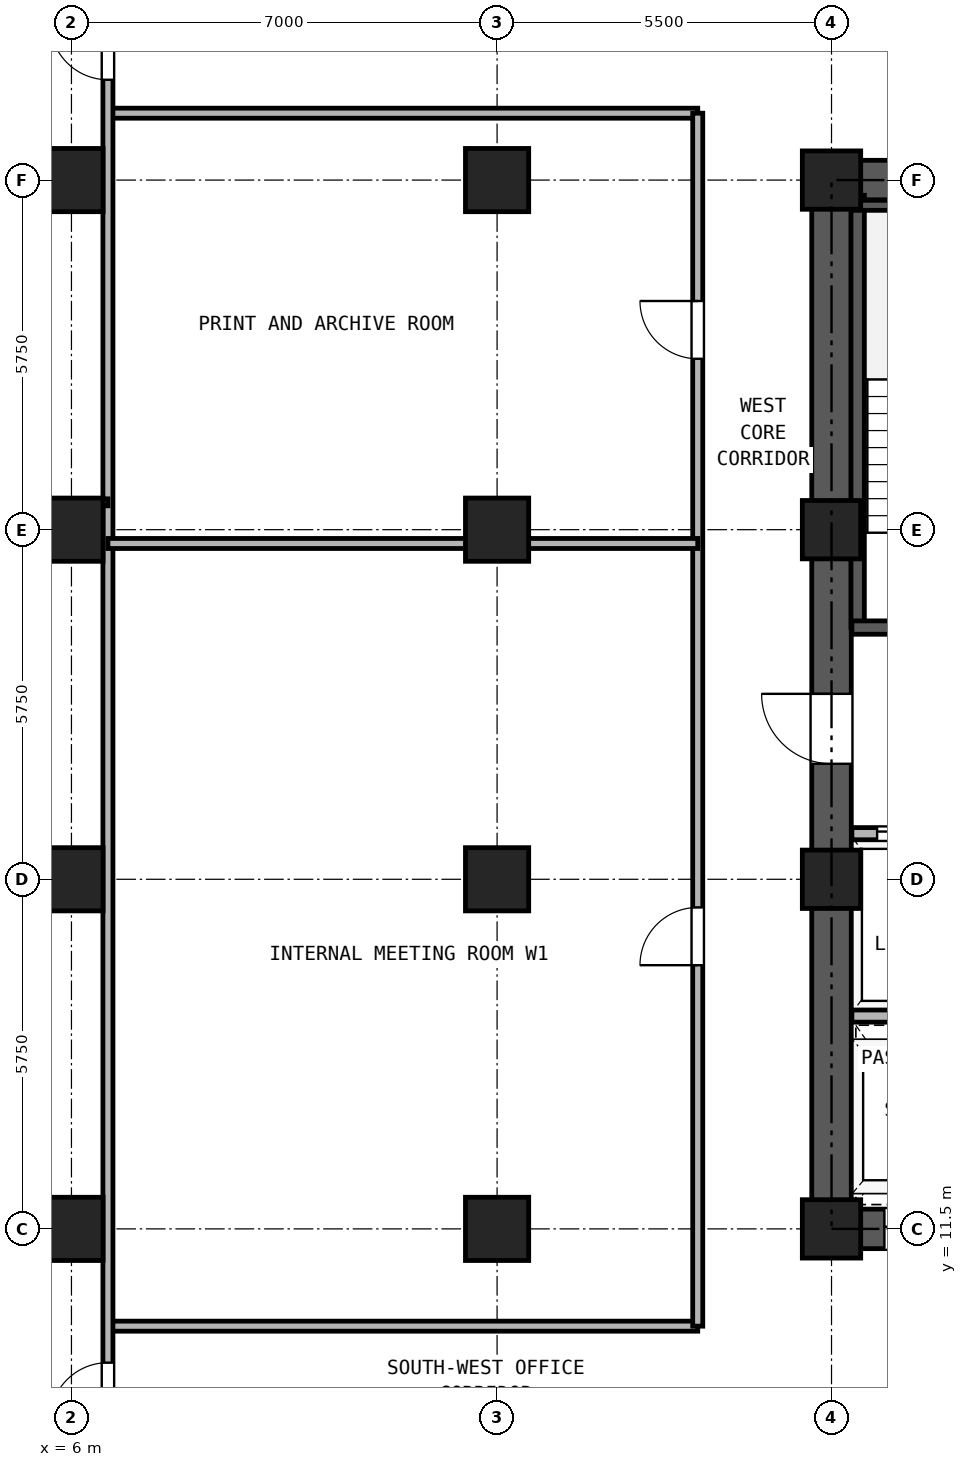
"""IFC4 building model, lengths in metres.
Left out: names, types, materials, properties, quantities, classifications, styles, units other than length and angle.
Written with IfcOpenShell. Run it as: python <this file> out.ifc"""

import sys

from ifc_helpers import new_model, si_unit, direction, frame, frame_2d, origin, origin_2d, place, context, subcontext, project, spatial, rectangle, hollow_rectangle, extrude, source, transform, mapped, element, fill, save


model = new_model("IFC4")
c1 = context("Model", 3, precision=1e-05, world=origin(), true_north=direction((0.0, 1.0)))
c2 = subcontext(c1, "Body", "Model", "MODEL_VIEW")
j1 = project(units=[si_unit("LENGTHUNIT", "METRE"), si_unit("PLANEANGLEUNIT", "RADIAN")], contexts=[c1])
p1 = place(None, origin())
s1 = spatial("IfcSite", under=j1, at=p1, CompositionType="ELEMENT")
p2 = place(p1, origin())
s2 = spatial("IfcBuilding", under=s1, at=p2, CompositionType="ELEMENT")
p3 = place(p2, frame((0.0, 0.0, 84.6)))
s3 = spatial("IfcBuildingStorey", under=s2, at=p3, CompositionType="ELEMENT", Elevation=84.6)
m1 = source(origin(), c2, "Body", "SweptSolid", [
    extrude(hollow_rectangle(XDim=1.04, YDim=1.04, WallThickness=0.065, at=origin_2d()), origin(), (0.0, 0.0, 1.0), 3.24),
])
for number, where, z_axis, x_axis in (
    (1, (6.0, 11.5, 0.0), (0.0, 0.0, 1.0), (1.0, 0.0, 0.0)),
    (2, (6.0, 17.25, 0.0), (0.0, 0.0, 1.0), (1.0, 0.0, 0.0)),
    (3, (6.0, 23.0, 0.0), (0.0, 0.0, 1.0), (1.0, 0.0, 0.0)),
    (4, (6.0, 28.75, 0.0), (0.0, 0.0, 1.0), (1.0, 0.0, 0.0)),
    (5, (13.0, 11.5, 0.0), (0.0, 0.0, 1.0), (1.0, 0.0, 0.0)),
    (6, (13.0, 17.25, 0.0), (0.0, 0.0, 1.0), (1.0, 0.0, 0.0)),
    (7, (13.0, 23.0, 0.0), (0.0, 0.0, 1.0), (1.0, 0.0, 0.0)),
    (8, (13.0, 28.75, 0.0), (0.0, 0.0, 1.0), (1.0, 0.0, 0.0)),
):
    element("IfcColumn", number, at=place(p3, frame(where, z_axis=z_axis, x_axis=x_axis)), inside=s3, PredefinedType="COLUMN", context=c2, shape_type="MappedRepresentation", body=[
        mapped(m1, transform((0.0, 0.0, 0.0), x_axis=(1.0, 0.0, 0.0), y_axis=(0.0, 1.0, 0.0), z_axis=(0.0, 0.0, 1.0), scale=1.0)),
    ])
m2 = source(origin(), c2, "Body", "SweptSolid", [
    extrude(hollow_rectangle(XDim=0.96, YDim=0.96, WallThickness=0.06, at=origin_2d()), origin(), (0.0, 0.0, 1.0), 3.24),
])
for number, where, z_axis, x_axis in (
    (9, (18.5, 11.5, 0.0), (0.0, 0.0, 1.0), (1.0, 0.0, 0.0)),
    (10, (18.5, 17.25, 0.0), (0.0, 0.0, 1.0), (1.0, 0.0, 0.0)),
    (11, (18.5, 23.0, 0.0), (0.0, 0.0, 1.0), (1.0, 0.0, 0.0)),
    (12, (18.5, 28.75, 0.0), (0.0, 0.0, 1.0), (1.0, 0.0, 0.0)),
):
    element("IfcColumn", number, at=place(p3, frame(where, z_axis=z_axis, x_axis=x_axis)), inside=s3, PredefinedType="COLUMN", context=c2, shape_type="MappedRepresentation", body=[
        mapped(m2, transform((0.0, 0.0, 0.0), x_axis=(1.0, 0.0, 0.0), y_axis=(0.0, 1.0, 0.0), z_axis=(0.0, 0.0, 1.0), scale=1.0)),
    ])
p4 = place(p3, frame((18.175, 11.5, 0.0), z_axis=(0.0, 0.0, 1.0), x_axis=(1.0, 0.0, 0.0)))
e13 = element("IfcWall", 13, at=p4, inside=s3, PredefinedType="SHEAR", context=c2, shape_type="SweptSolid", body=[
    extrude(rectangle(XDim=10.65, YDim=0.65, at=frame_2d((5.325, 0.0))), origin(), (0.0, 0.0, 1.0), 3.24),
])
p5 = place(p4, frame((1.195, 0.0, 0.0)))
e14 = element("IfcOpeningElement", 14, at=p5, cuts=e13, PredefinedType="OPENING", context=c2, shape_type="SweptSolid", body=[
    extrude(rectangle(XDim=1.1, YDim=2.25, at=frame_2d((0.55, 1.125))), frame((0.0, 0.335, 0.0), z_axis=(0.0, -1.0, 0.0), x_axis=(1.0, 0.0, 0.0)), (0.0, 0.0, 1.0), 0.67),
])
p6 = place(p4, frame((3.495, 0.0, 0.0)))
e15 = element("IfcOpeningElement", 15, at=p6, cuts=e13, PredefinedType="OPENING", context=c2, shape_type="SweptSolid", body=[
    extrude(rectangle(XDim=1.1, YDim=2.25, at=frame_2d((0.55, 1.125))), frame((0.0, 0.335, 0.0), z_axis=(0.0, -1.0, 0.0), x_axis=(1.0, 0.0, 0.0)), (0.0, 0.0, 1.0), 0.67),
])
p7 = place(p4, frame((5.925, 0.0, 0.0)))
e16 = element("IfcOpeningElement", 16, at=p7, cuts=e13, PredefinedType="OPENING", context=c2, shape_type="SweptSolid", body=[
    extrude(rectangle(XDim=1.1, YDim=2.25, at=frame_2d((0.55, 1.125))), frame((0.0, 0.335, 0.0), z_axis=(0.0, -1.0, 0.0), x_axis=(1.0, 0.0, 0.0)), (0.0, 0.0, 1.0), 0.67),
])
p8 = place(p4, frame((8.325, 0.0, 0.0)))
e17 = element("IfcOpeningElement", 17, at=p8, cuts=e13, PredefinedType="OPENING", context=c2, shape_type="SweptSolid", body=[
    extrude(rectangle(XDim=1.1, YDim=2.25, at=frame_2d((0.55, 1.125))), frame((0.0, 0.335, 0.0), z_axis=(0.0, -1.0, 0.0), x_axis=(1.0, 0.0, 0.0)), (0.0, 0.0, 1.0), 0.67),
])
p9 = place(p3, frame((18.175, 28.75, 0.0), z_axis=(0.0, 0.0, 1.0), x_axis=(1.0, 0.0, 0.0)))
e18 = element("IfcWall", 18, at=p9, inside=s3, PredefinedType="SHEAR", context=c2, shape_type="SweptSolid", body=[
    extrude(rectangle(XDim=10.65, YDim=0.65, at=frame_2d((5.325, 0.0))), origin(), (0.0, 0.0, 1.0), 3.24),
])
p10 = place(p9, frame((4.205, 0.0, 0.0)))
e19 = element("IfcOpeningElement", 19, at=p10, cuts=e18, PredefinedType="OPENING", context=c2, shape_type="SweptSolid", body=[
    extrude(rectangle(XDim=0.9, YDim=2.05, at=frame_2d((0.45, 1.025))), frame((0.0, 0.335, 0.0), z_axis=(0.0, -1.0, 0.0), x_axis=(1.0, 0.0, 0.0)), (0.0, 0.0, 1.0), 0.67),
])
p11 = place(p9, frame((5.745, 0.0, 0.0)))
e20 = element("IfcOpeningElement", 20, at=p11, cuts=e18, PredefinedType="OPENING", context=c2, shape_type="SweptSolid", body=[
    extrude(rectangle(XDim=0.9, YDim=2.05, at=frame_2d((0.45, 1.025))), frame((0.0, 0.335, 0.0), z_axis=(0.0, -1.0, 0.0), x_axis=(1.0, 0.0, 0.0)), (0.0, 0.0, 1.0), 0.67),
])
p12 = place(p3, frame((18.5, 11.825, 0.0), z_axis=(0.0, 0.0, 1.0), x_axis=(0.0, 1.0, 0.0)))
e21 = element("IfcWall", 21, at=p12, inside=s3, PredefinedType="SHEAR", context=c2, shape_type="SweptSolid", body=[
    extrude(rectangle(XDim=16.6, YDim=0.65, at=frame_2d((8.3, 0.0))), origin(), (0.0, 0.0, 1.0), 3.24),
])
p13 = place(p12, frame((7.325, 0.0, 0.0)))
e22 = element("IfcOpeningElement", 22, at=p13, cuts=e21, PredefinedType="OPENING", context=c2, shape_type="SweptSolid", body=[
    extrude(rectangle(XDim=1.15, YDim=2.2, at=frame_2d((0.575, 1.1))), frame((0.0, 0.335, 0.0), z_axis=(0.0, -1.0, 0.0), x_axis=(1.0, 0.0, 0.0)), (0.0, 0.0, 1.0), 0.67),
])
p14 = place(p3, frame((18.93, 21.39, 0.0), z_axis=(0.0, 0.0, 1.0), x_axis=(0.0, 1.0, 0.0)))
e23 = element("IfcWall", 23, at=p14, inside=s3, PredefinedType="SOLIDWALL", context=c2, shape_type="SweptSolid", body=[
    extrude(rectangle(XDim=7.11, YDim=0.22, at=frame_2d((3.555, 0.0))), origin(), (0.0, 0.0, 1.0), 3.24),
])
p15 = place(p3, frame((18.835, 28.335, 0.0), z_axis=(0.0, 0.0, 1.0), x_axis=(1.0, 0.0, 0.0)))
e24 = element("IfcWall", 24, at=p15, inside=s3, PredefinedType="PARTITIONING", context=c2, shape_type="SweptSolid", body=[
    extrude(rectangle(XDim=3.275, YDim=0.165, at=frame_2d((1.638, 0.0))), origin(), (0.0, 0.0, 1.0), 3.24),
])
p16 = place(p3, frame((18.835, 21.39, 0.0), z_axis=(0.0, 0.0, 1.0), x_axis=(1.0, 0.0, 0.0)))
e25 = element("IfcWall", 25, at=p16, inside=s3, PredefinedType="SOLIDWALL", context=c2, shape_type="SweptSolid", body=[
    extrude(rectangle(XDim=6.295, YDim=0.22, at=frame_2d((3.147, 0.0))), origin(), (0.0, 0.0, 1.0), 3.24),
])
p17 = place(p16, frame((1.015, 0.0, 0.0)))
e26 = element("IfcOpeningElement", 26, at=p17, cuts=e25, PredefinedType="OPENING", context=c2, shape_type="SweptSolid", body=[
    extrude(rectangle(XDim=1.15, YDim=2.2, at=frame_2d((0.575, 1.1))), frame((0.0, 0.12, 0.0), z_axis=(0.0, -1.0, 0.0), x_axis=(1.0, 0.0, 0.0)), (0.0, 0.0, 1.0), 0.24),
])
p18 = place(p16, frame((4.745, 0.0, 0.0)))
e27 = element("IfcOpeningElement", 27, at=p18, cuts=e25, PredefinedType="OPENING", context=c2, shape_type="SweptSolid", body=[
    extrude(rectangle(XDim=1.1, YDim=2.25, at=frame_2d((0.55, 1.125))), frame((0.0, 0.12, 0.0), z_axis=(0.0, -1.0, 0.0), x_axis=(1.0, 0.0, 0.0)), (0.0, 0.0, 1.0), 0.24),
])
p19 = place(p3, frame((18.835, 18.0, 0.0), z_axis=(0.0, 0.0, 1.0), x_axis=(1.0, 0.0, 0.0)))
e28 = element("IfcWall", 28, at=p19, inside=s3, PredefinedType="PARTITIONING", context=c2, shape_type="SweptSolid", body=[
    extrude(rectangle(XDim=9.33, YDim=0.2, at=frame_2d((4.665, 0.0))), origin(), (0.0, 0.0, 1.0), 3.24),
])
p20 = place(p19, frame((0.415, 0.0, 0.0)))
e29 = element("IfcOpeningElement", 29, at=p20, cuts=e28, PredefinedType="OPENING", context=c2, shape_type="SweptSolid", body=[
    extrude(rectangle(XDim=1.3, YDim=2.3, at=frame_2d((0.65, 1.15))), frame((0.0, 0.11, 0.0), z_axis=(0.0, -1.0, 0.0), x_axis=(1.0, 0.0, 0.0)), (0.0, 0.0, 1.0), 0.22),
])
p21 = place(p19, frame((2.515, 0.0, 0.0)))
e30 = element("IfcOpeningElement", 30, at=p21, cuts=e28, PredefinedType="OPENING", context=c2, shape_type="SweptSolid", body=[
    extrude(rectangle(XDim=1.3, YDim=2.3, at=frame_2d((0.65, 1.15))), frame((0.0, 0.11, 0.0), z_axis=(0.0, -1.0, 0.0), x_axis=(1.0, 0.0, 0.0)), (0.0, 0.0, 1.0), 0.22),
])
p22 = place(p19, frame((7.015, 0.0, 0.0)))
e31 = element("IfcOpeningElement", 31, at=p22, cuts=e28, PredefinedType="OPENING", context=c2, shape_type="SweptSolid", body=[
    extrude(rectangle(XDim=1.0, YDim=2.15, at=frame_2d((0.5, 1.075))), frame((0.0, 0.11, 0.0), z_axis=(0.0, -1.0, 0.0), x_axis=(1.0, 0.0, 0.0)), (0.0, 0.0, 1.0), 0.22),
])
p23 = place(p3, frame((18.835, 15.0, 0.0), z_axis=(0.0, 0.0, 1.0), x_axis=(1.0, 0.0, 0.0)))
e32 = element("IfcWall", 32, at=p23, inside=s3, PredefinedType="PARTITIONING", context=c2, shape_type="SweptSolid", body=[
    extrude(rectangle(XDim=9.33, YDim=0.2, at=frame_2d((4.665, 0.0))), origin(), (0.0, 0.0, 1.0), 3.24),
])
for number, where, z_axis, x_axis in (
    (33, (6.6, 9.9, 0.0), (0.0, 0.0, 1.0), (1.0, 0.0, 0.0)),
    (34, (6.6, 29.85, 0.0), (0.0, 0.0, 1.0), (1.0, 0.0, 0.0)),
):
    element("IfcWall", number, at=place(p3, frame(where, z_axis=z_axis, x_axis=x_axis)), inside=s3, PredefinedType="PARTITIONING", context=c2, shape_type="SweptSolid", body=[
        extrude(rectangle(XDim=9.7, YDim=0.165, at=frame_2d((4.85, 0.0))), origin(), (0.0, 0.0, 1.0), 3.24),
    ])
p24 = place(p3, frame((16.3, 9.9, 0.0), z_axis=(0.0, 0.0, 1.0), x_axis=(0.0, 1.0, 0.0)))
e35 = element("IfcWall", 35, at=p24, inside=s3, PredefinedType="PARTITIONING", context=c2, shape_type="SweptSolid", body=[
    extrude(rectangle(XDim=19.95, YDim=0.165, at=frame_2d((9.975, 0.0))), origin(), (0.0, 0.0, 1.0), 3.24),
])
p25 = place(p24, frame((5.937, 0.0, 0.0)))
e36 = element("IfcOpeningElement", 36, at=p25, cuts=e35, PredefinedType="OPENING", context=c2, shape_type="SweptSolid", body=[
    extrude(rectangle(XDim=0.95, YDim=2.15, at=frame_2d((0.475, 1.075))), frame((0.0, 0.093, 0.0), z_axis=(0.0, -1.0, 0.0), x_axis=(1.0, 0.0, 0.0)), (0.0, 0.0, 1.0), 0.185),
])
p26 = place(p24, frame((15.911, 0.0, 0.0)))
e37 = element("IfcOpeningElement", 37, at=p26, cuts=e35, PredefinedType="OPENING", context=c2, shape_type="SweptSolid", body=[
    extrude(rectangle(XDim=0.95, YDim=2.15, at=frame_2d((0.475, 1.075))), frame((0.0, 0.093, 0.0), z_axis=(0.0, -1.0, 0.0), x_axis=(1.0, 0.0, 0.0)), (0.0, 0.0, 1.0), 0.185),
])
p27 = place(p3, frame((6.6, 0.16, 0.0), z_axis=(0.0, 0.0, 1.0), x_axis=(0.0, 1.0, 0.0)))
e38 = element("IfcWall", 38, at=p27, inside=s3, PredefinedType="PARTITIONING", context=c2, shape_type="SweptSolid", body=[
    extrude(rectangle(XDim=40.18, YDim=0.165, at=frame_2d((20.09, 0.0))), origin(), (0.0, 0.0, 1.0), 3.24),
])
p28 = place(p27, frame((8.19, 0.0, 0.0)))
e39 = element("IfcOpeningElement", 39, at=p28, cuts=e38, PredefinedType="OPENING", context=c2, shape_type="SweptSolid", body=[
    extrude(rectangle(XDim=0.95, YDim=2.15, at=frame_2d((0.475, 1.075))), frame((0.0, 0.093, 0.0), z_axis=(0.0, -1.0, 0.0), x_axis=(1.0, 0.0, 0.0)), (0.0, 0.0, 1.0), 0.185),
])
p29 = place(p27, frame((30.24, 0.0, 0.0)))
e40 = element("IfcOpeningElement", 40, at=p29, cuts=e38, PredefinedType="OPENING", context=c2, shape_type="SweptSolid", body=[
    extrude(rectangle(XDim=0.95, YDim=2.15, at=frame_2d((0.475, 1.075))), frame((0.0, 0.093, 0.0), z_axis=(0.0, -1.0, 0.0), x_axis=(1.0, 0.0, 0.0)), (0.0, 0.0, 1.0), 0.185),
])
p30 = place(p3, frame((0.16, 23.45, 0.0), z_axis=(0.0, 0.0, 1.0), x_axis=(1.0, 0.0, 0.0)))
e41 = element("IfcWall", 41, at=p30, inside=s3, PredefinedType="PARTITIONING", context=c2, shape_type="SweptSolid", body=[
    extrude(rectangle(XDim=6.44, YDim=0.115, at=frame_2d((3.22, 0.0))), origin(), (0.0, 0.0, 1.0), 3.24),
])
p31 = place(p3, frame((6.6, 22.773, 0.0), z_axis=(0.0, 0.0, 1.0), x_axis=(1.0, 0.0, 0.0)))
e42 = element("IfcWall", 42, at=p31, inside=s3, PredefinedType="PARTITIONING", context=c2, shape_type="SweptSolid", body=[
    extrude(rectangle(XDim=9.7, YDim=0.165, at=frame_2d((4.85, 0.0))), origin(), (0.0, 0.0, 1.0), 2.459),
])
p32 = place(p20, origin())
e43 = element("IfcDoor", 43, at=p32, inside=s3, OperationType="DOUBLE_DOOR_SLIDING", PredefinedType="DOOR", context=c2, shape_type="SweptSolid", body=[
    extrude(rectangle(XDim=1.3, YDim=2.3, at=frame_2d((0.65, 1.15))), frame((0.0, 0.025, 0.0), z_axis=(0.0, -1.0, 0.0), x_axis=(1.0, 0.0, 0.0)), (0.0, 0.0, 1.0), 0.05),
])
fill(e29, e43)
p33 = place(p13, frame((1.15, 0.0, 0.0), z_axis=(0.0, 0.0, 1.0), x_axis=(-1.0, 0.0, 0.0)))
e44 = element("IfcDoor", 44, at=p33, inside=s3, OperationType="SINGLE_SWING_RIGHT", PredefinedType="DOOR", context=c2, shape_type="SweptSolid", body=[
    extrude(rectangle(XDim=1.15, YDim=2.2, at=frame_2d((0.575, 1.1))), frame((0.0, 0.025, 0.0), z_axis=(0.0, -1.0, 0.0), x_axis=(1.0, 0.0, 0.0)), (0.0, 0.0, 1.0), 0.05),
])
fill(e22, e44)
p34 = place(p5, frame((1.1, 0.0, 0.0), z_axis=(0.0, 0.0, 1.0), x_axis=(-1.0, 0.0, 0.0)))
e45 = element("IfcDoor", 45, at=p34, inside=s3, OperationType="DOUBLE_DOOR_SLIDING", PredefinedType="DOOR", context=c2, shape_type="SweptSolid", body=[
    extrude(rectangle(XDim=1.1, YDim=2.25, at=frame_2d((0.55, 1.125))), frame((0.0, 0.025, 0.0), z_axis=(0.0, -1.0, 0.0), x_axis=(1.0, 0.0, 0.0)), (0.0, 0.0, 1.0), 0.05),
])
fill(e14, e45)
p35 = place(p28, frame((0.95, 0.0, 0.0), z_axis=(0.0, 0.0, 1.0), x_axis=(-1.0, 0.0, 0.0)))
e46 = element("IfcDoor", 46, at=p35, inside=s3, OperationType="SINGLE_SWING_LEFT", PredefinedType="DOOR", context=c2, shape_type="SweptSolid", body=[
    extrude(rectangle(XDim=0.95, YDim=2.15, at=frame_2d((0.475, 1.075))), frame((0.0, 0.025, 0.0), z_axis=(0.0, -1.0, 0.0), x_axis=(1.0, 0.0, 0.0)), (0.0, 0.0, 1.0), 0.05),
])
fill(e39, e46)
p36 = place(p29, frame((0.95, 0.0, 0.0), z_axis=(0.0, 0.0, 1.0), x_axis=(-1.0, 0.0, 0.0)))
e47 = element("IfcDoor", 47, at=p36, inside=s3, OperationType="SINGLE_SWING_RIGHT", PredefinedType="DOOR", context=c2, shape_type="SweptSolid", body=[
    extrude(rectangle(XDim=0.95, YDim=2.15, at=frame_2d((0.475, 1.075))), frame((0.0, 0.025, 0.0), z_axis=(0.0, -1.0, 0.0), x_axis=(1.0, 0.0, 0.0)), (0.0, 0.0, 1.0), 0.05),
])
fill(e40, e47)
p37 = place(p25, frame((0.95, 0.0, 0.0), z_axis=(0.0, 0.0, 1.0), x_axis=(-1.0, 0.0, 0.0)))
e48 = element("IfcDoor", 48, at=p37, inside=s3, OperationType="SINGLE_SWING_LEFT", PredefinedType="DOOR", context=c2, shape_type="SweptSolid", body=[
    extrude(rectangle(XDim=0.95, YDim=2.15, at=frame_2d((0.475, 1.075))), frame((0.0, 0.025, 0.0), z_axis=(0.0, -1.0, 0.0), x_axis=(1.0, 0.0, 0.0)), (0.0, 0.0, 1.0), 0.05),
])
fill(e36, e48)
p38 = place(p26, frame((0.95, 0.0, 0.0), z_axis=(0.0, 0.0, 1.0), x_axis=(-1.0, 0.0, 0.0)))
e49 = element("IfcDoor", 49, at=p38, inside=s3, OperationType="SINGLE_SWING_RIGHT", PredefinedType="DOOR", context=c2, shape_type="SweptSolid", body=[
    extrude(rectangle(XDim=0.95, YDim=2.15, at=frame_2d((0.475, 1.075))), frame((0.0, 0.025, 0.0), z_axis=(0.0, -1.0, 0.0), x_axis=(1.0, 0.0, 0.0)), (0.0, 0.0, 1.0), 0.05),
])
fill(e37, e49)
save(model, sys.argv[1])
